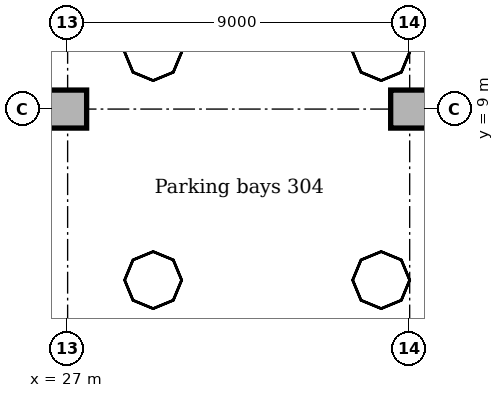
"""IFC4 building model, lengths in metres.
Left out: names, types, materials, properties, quantities, classifications, styles, units other than length and angle.
Written with IfcOpenShell. Run it as: python <this file> out.ifc"""

import sys

from ifc_helpers import new_model, si_unit, direction, frame, origin, origin_2d, place, context, subcontext, project, spatial, rectangle, extrude, element, save


model = new_model("IFC4")
c1 = context("Model", 3, precision=1e-05, world=origin(), true_north=direction((0.0, 1.0)))
c2 = subcontext(c1, "Body", "Model", "MODEL_VIEW")
j1 = project(units=[si_unit("LENGTHUNIT", "METRE"), si_unit("PLANEANGLEUNIT", "RADIAN")], contexts=[c1])
p1 = place(None, origin())
s1 = spatial("IfcSite", under=j1, at=p1, CompositionType="ELEMENT")
p2 = place(p1, origin())
s2 = spatial("IfcBuilding", under=s1, at=p2, CompositionType="ELEMENT")
p3 = place(p2, frame((0.0, 0.0, -14.0)))
s3 = spatial("IfcBuildingStorey", under=s2, at=p3, CompositionType="ELEMENT", Elevation=-14.0)
for number, where, z_axis, x_axis in (
    (1, (27.0, 9.0, 0.0), (0.0, 0.0, 1.0), (1.0, 0.0, 0.0)),
    (2, (36.0, 9.0, 0.0), (0.0, 0.0, 1.0), (1.0, 0.0, 0.0)),
):
    element("IfcColumn", number, at=place(p3, frame(where, z_axis=z_axis, x_axis=x_axis)), inside=s3, PredefinedType="COLUMN", context=c2, shape_type="SweptSolid", body=[
        extrude(rectangle(XDim=1.0, YDim=1.0, at=origin_2d()), origin(), (0.0, 0.0, 1.0), 4.15),
    ])
save(model, sys.argv[1])
